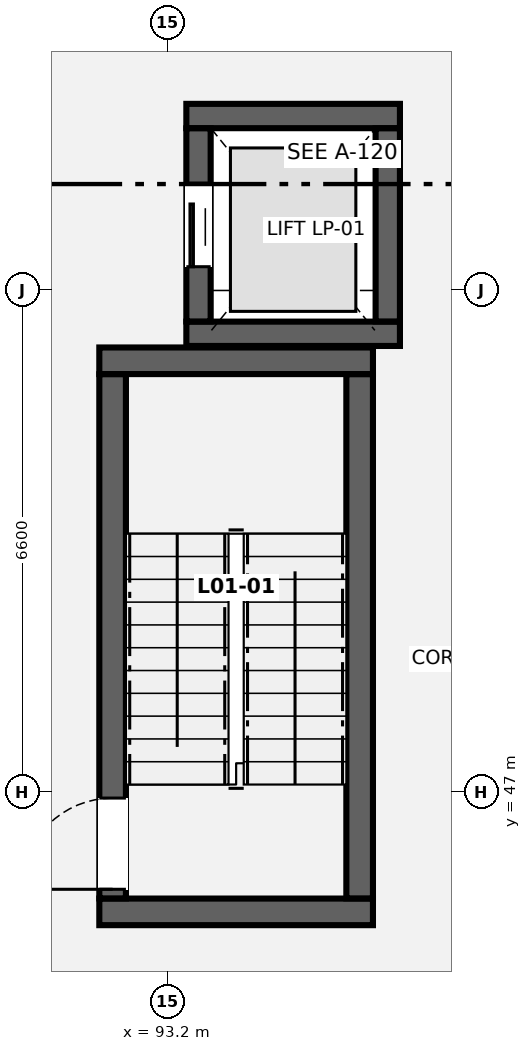
"""IFC4 building model, lengths in metres.
Left out: names, types, materials, properties, quantities, classifications, styles, units other than length and angle.
Written with IfcOpenShell. Run it as: python <this file> out.ifc"""

import sys

from ifc_helpers import new_model, si_unit, direction, frame, frame_2d, origin, place, context, subcontext, project, spatial, rectangle, extrude, element, fill, save


model = new_model("IFC4")
c1 = context("Model", 3, precision=1e-05, world=origin(), true_north=direction((0.0, 1.0)))
c2 = subcontext(c1, "Body", "Model", "MODEL_VIEW")
j1 = project(units=[si_unit("LENGTHUNIT", "METRE"), si_unit("PLANEANGLEUNIT", "RADIAN")], contexts=[c1])
p1 = place(None, origin())
s1 = spatial("IfcSite", under=j1, at=p1, CompositionType="ELEMENT")
p2 = place(p1, origin())
s2 = spatial("IfcBuilding", under=s1, at=p2, CompositionType="ELEMENT")
p3 = place(p2, frame((0.0, 0.0, 4.9)))
s3 = spatial("IfcBuildingStorey", under=s2, at=p3, CompositionType="ELEMENT", Elevation=4.9)
for number, where, z_axis, x_axis in (
    (1, (92.3, 45.425, 0.0), (0.0, 0.0, 1.0), (1.0, 0.0, 0.0)),
    (2, (92.3, 52.675, 0.0), (0.0, 0.0, 1.0), (1.0, 0.0, 0.0)),
):
    element("IfcWall", number, at=place(p3, frame(where, z_axis=z_axis, x_axis=x_axis)), inside=s3, PredefinedType="SHEAR", context=c2, shape_type="SweptSolid", body=[
        extrude(rectangle(XDim=3.6, YDim=0.35, at=frame_2d((1.8, 0.0))), origin(), (0.0, 0.0, 1.0), 3.98),
    ])
p4 = place(p3, frame((92.475, 45.602, 0.0), z_axis=(0.0, 0.0, 1.0), x_axis=(0.0, 1.0, 0.0)))
e3 = element("IfcWall", 3, at=p4, inside=s3, PredefinedType="SHEAR", context=c2, shape_type="SweptSolid", body=[
    extrude(rectangle(XDim=6.896, YDim=0.35, at=frame_2d((3.448, 0.0))), origin(), (0.0, 0.0, 1.0), 3.98),
])
p5 = place(p4, frame((0.12, 0.0, 0.0)))
e4 = element("IfcOpeningElement", 4, at=p5, cuts=e3, PredefinedType="OPENING", context=c2, shape_type="SweptSolid", body=[
    extrude(rectangle(XDim=1.2, YDim=2.15, at=frame_2d((0.6, 1.075))), frame((0.0, 0.185, 0.0), z_axis=(0.0, -1.0, 0.0), x_axis=(1.0, 0.0, 0.0)), (0.0, 0.0, 1.0), 0.37),
])
p6 = place(p3, frame((95.725, 45.602, 0.0), z_axis=(0.0, 0.0, 1.0), x_axis=(0.0, 1.0, 0.0)))
e5 = element("IfcWall", 5, at=p6, inside=s3, PredefinedType="SHEAR", context=c2, shape_type="SweptSolid", body=[
    extrude(rectangle(XDim=6.896, YDim=0.35, at=frame_2d((3.448, 0.0))), origin(), (0.0, 0.0, 1.0), 3.98),
])
for number, where, z_axis, x_axis in (
    (6, (93.445, 53.03, 0.0), (0.0, 0.0, 1.0), (1.0, 0.0, 0.0)),
    (7, (93.445, 55.895, 0.0), (0.0, 0.0, 1.0), (1.0, 0.0, 0.0)),
):
    element("IfcWall", number, at=place(p3, frame(where, z_axis=z_axis, x_axis=x_axis)), inside=s3, PredefinedType="SHEAR", context=c2, shape_type="SweptSolid", body=[
        extrude(rectangle(XDim=2.81, YDim=0.32, at=frame_2d((1.405, 0.0))), origin(), (0.0, 0.0, 1.0), 3.98),
    ])
p7 = place(p3, frame((93.605, 53.192, 0.0), z_axis=(0.0, 0.0, 1.0), x_axis=(0.0, 1.0, 0.0)))
e8 = element("IfcWall", 8, at=p7, inside=s3, PredefinedType="SHEAR", context=c2, shape_type="SweptSolid", body=[
    extrude(rectangle(XDim=2.541, YDim=0.32, at=frame_2d((1.271, 0.0))), origin(), (0.0, 0.0, 1.0), 3.98),
])
p8 = place(p7, frame((0.72, 0.0, 0.0)))
e9 = element("IfcOpeningElement", 9, at=p8, cuts=e8, PredefinedType="OPENING", context=c2, shape_type="SweptSolid", body=[
    extrude(rectangle(XDim=1.1, YDim=2.15, at=frame_2d((0.55, 1.075))), frame((0.0, 0.17, 0.0), z_axis=(0.0, -1.0, 0.0), x_axis=(1.0, 0.0, 0.0)), (0.0, 0.0, 1.0), 0.34),
])
p9 = place(p3, frame((96.095, 53.192, 0.0), z_axis=(0.0, 0.0, 1.0), x_axis=(0.0, 1.0, 0.0)))
e10 = element("IfcWall", 10, at=p9, inside=s3, PredefinedType="SHEAR", context=c2, shape_type="SweptSolid", body=[
    extrude(rectangle(XDim=2.541, YDim=0.32, at=frame_2d((1.271, 0.0))), origin(), (0.0, 0.0, 1.0), 3.98),
])
p10 = place(p5, origin())
e11 = element("IfcDoor", 11, at=p10, inside=s3, OperationType="SINGLE_SWING_LEFT", PredefinedType="DOOR", context=c2, shape_type="SweptSolid", body=[
    extrude(rectangle(XDim=1.2, YDim=2.15, at=frame_2d((0.6, 1.075))), frame((0.0, 0.025, 0.0), z_axis=(0.0, -1.0, 0.0), x_axis=(1.0, 0.0, 0.0)), (0.0, 0.0, 1.0), 0.05),
])
fill(e4, e11)
p11 = place(p8, origin())
e12 = element("IfcDoor", 12, at=p11, inside=s3, OperationType="SLIDING_TO_LEFT", PredefinedType="DOOR", context=c2, shape_type="SweptSolid", body=[
    extrude(rectangle(XDim=1.1, YDim=2.15, at=frame_2d((0.55, 1.075))), frame((0.0, 0.025, 0.0), z_axis=(0.0, -1.0, 0.0), x_axis=(1.0, 0.0, 0.0)), (0.0, 0.0, 1.0), 0.05),
])
fill(e9, e12)
save(model, sys.argv[1])
